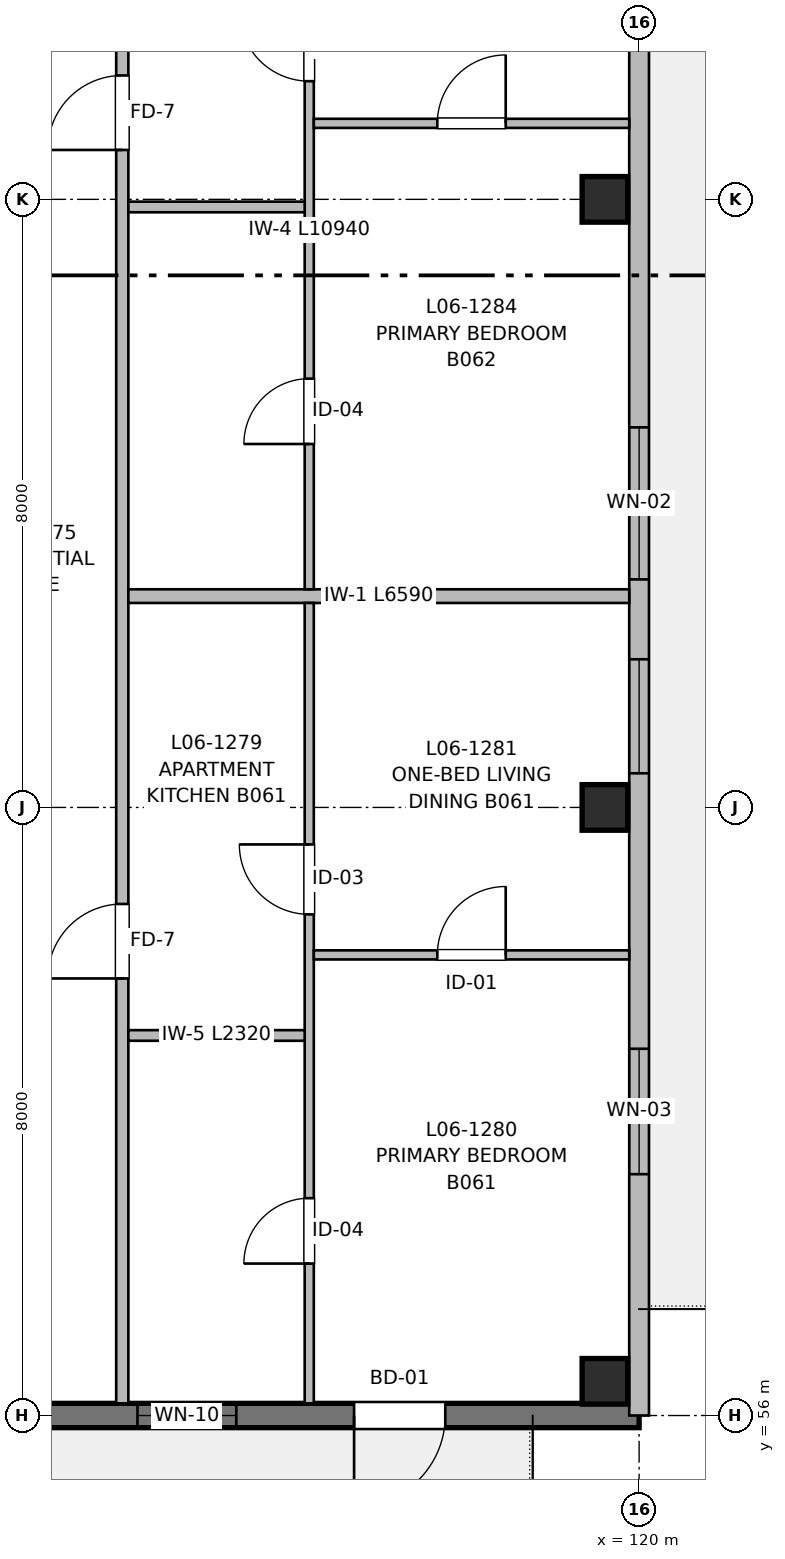
"""IFC4 building model, lengths in metres.
Left out: names, types, materials, properties, quantities, classifications, styles, units other than length and angle.
Written with IfcOpenShell. Run it as: python <this file> out.ifc"""

import sys

from ifc_helpers import new_model, si_unit, direction, frame, frame_2d, origin, origin_2d, place, context, subcontext, project, spatial, rectangle, extrude, element, fill, save


model = new_model("IFC4")
c1 = context("Model", 3, precision=1e-05, world=origin(), true_north=direction((0.0, 1.0)))
c2 = subcontext(c1, "Body", "Model", "MODEL_VIEW")
j1 = project(units=[si_unit("LENGTHUNIT", "METRE"), si_unit("PLANEANGLEUNIT", "RADIAN")], contexts=[c1])
p1 = place(None, origin())
s1 = spatial("IfcSite", under=j1, at=p1, CompositionType="ELEMENT")
p2 = place(p1, origin())
s2 = spatial("IfcBuilding", under=s1, at=p2, CompositionType="ELEMENT")
p3 = place(p2, frame((0.0, 0.0, 20.16)))
s3 = spatial("IfcBuildingStorey", under=s2, at=p3, CompositionType="ELEMENT", Elevation=20.16)
for number, where, z_axis, x_axis in (
    (1, (119.55, 56.45, 0.0), (0.0, 0.0, 1.0), (1.0, 0.0, 0.0)),
    (2, (119.55, 64.0, 0.0), (0.0, 0.0, 1.0), (1.0, 0.0, 0.0)),
    (3, (119.55, 72.0, 0.0), (0.0, 0.0, 1.0), (1.0, 0.0, 0.0)),
):
    element("IfcColumn", number, at=place(p3, frame(where, z_axis=z_axis, x_axis=x_axis)), inside=s3, PredefinedType="COLUMN", context=c2, shape_type="SweptSolid", body=[
        extrude(rectangle(XDim=0.6, YDim=0.6, at=origin_2d()), origin(), (0.0, 0.0, 1.0), 3.2),
    ])
p4 = place(p3, frame((120.0, 56.0, 0.0), z_axis=(0.0, 0.0, 1.0), x_axis=(-1.0, 0.0, 0.0)))
e4 = element("IfcWall", 4, at=p4, inside=s3, PredefinedType="SHEAR", context=c2, shape_type="SweptSolid", body=[
    extrude(rectangle(XDim=16.0, YDim=0.32, at=frame_2d((8.0, 0.0))), origin(), (0.0, 0.0, 1.0), 2.98),
])
p5 = place(p4, frame((2.55, 0.0, 0.0)))
e5 = element("IfcOpeningElement", 5, at=p5, cuts=e4, PredefinedType="OPENING", context=c2, shape_type="SweptSolid", body=[
    extrude(rectangle(XDim=1.2, YDim=2.2, at=frame_2d((0.6, 1.1))), frame((0.0, 0.17, 0.0), z_axis=(0.0, -1.0, 0.0), x_axis=(1.0, 0.0, 0.0)), (0.0, 0.0, 1.0), 0.34),
])
p6 = place(p4, frame((5.3, 0.0, 0.82)))
e6 = element("IfcOpeningElement", 6, at=p6, cuts=e4, PredefinedType="OPENING", context=c2, shape_type="SweptSolid", body=[
    extrude(rectangle(XDim=1.3, YDim=1.4, at=frame_2d((0.65, 0.7))), frame((0.0, 0.17, 0.0), z_axis=(0.0, -1.0, 0.0), x_axis=(1.0, 0.0, 0.0)), (0.0, 0.0, 1.0), 0.34),
])
p7 = place(p4, frame((11.1, 0.0, 0.72)))
e7 = element("IfcOpeningElement", 7, at=p7, cuts=e4, PredefinedType="OPENING", context=c2, shape_type="SweptSolid", body=[
    extrude(rectangle(XDim=1.8, YDim=1.5, at=frame_2d((0.9, 0.75))), frame((0.0, 0.17, 0.0), z_axis=(0.0, -1.0, 0.0), x_axis=(1.0, 0.0, 0.0)), (0.0, 0.0, 1.0), 0.34),
])
p8 = place(p3, frame((120.0, 88.0, 0.0), z_axis=(0.0, 0.0, 1.0), x_axis=(0.0, -1.0, 0.0)))
e8 = element("IfcWall", 8, at=p8, inside=s3, PredefinedType="SOLIDWALL", context=c2, shape_type="SweptSolid", body=[
    extrude(rectangle(XDim=32.0, YDim=0.26, at=frame_2d((16.0, 0.0))), origin(), (0.0, 0.0, 1.0), 2.98),
])
p9 = place(p8, frame((3.4, 0.0, 0.0)))
e9 = element("IfcOpeningElement", 9, at=p9, cuts=e8, PredefinedType="OPENING", context=c2, shape_type="SweptSolid", body=[
    extrude(rectangle(XDim=1.2, YDim=2.2, at=frame_2d((0.6, 1.1))), frame((0.0, 0.14, 0.0), z_axis=(0.0, -1.0, 0.0), x_axis=(1.0, 0.0, 0.0)), (0.0, 0.0, 1.0), 0.28),
])
p10 = place(p8, frame((6.15, 0.0, 0.82)))
e10 = element("IfcOpeningElement", 10, at=p10, cuts=e8, PredefinedType="OPENING", context=c2, shape_type="SweptSolid", body=[
    extrude(rectangle(XDim=1.3, YDim=1.4, at=frame_2d((0.65, 0.7))), frame((0.0, 0.14, 0.0), z_axis=(0.0, -1.0, 0.0), x_axis=(1.0, 0.0, 0.0)), (0.0, 0.0, 1.0), 0.28),
])
p11 = place(p8, frame((11.1, 0.0, 0.72)))
e11 = element("IfcOpeningElement", 11, at=p11, cuts=e8, PredefinedType="OPENING", context=c2, shape_type="SweptSolid", body=[
    extrude(rectangle(XDim=1.8, YDim=1.5, at=frame_2d((0.9, 0.75))), frame((0.0, 0.14, 0.0), z_axis=(0.0, -1.0, 0.0), x_axis=(1.0, 0.0, 0.0)), (0.0, 0.0, 1.0), 0.28),
])
p12 = place(p8, frame((19.0, 0.0, 0.72)))
e12 = element("IfcOpeningElement", 12, at=p12, cuts=e8, PredefinedType="OPENING", context=c2, shape_type="SweptSolid", body=[
    extrude(rectangle(XDim=2.0, YDim=1.5, at=frame_2d((1.0, 0.75))), frame((0.0, 0.14, 0.0), z_axis=(0.0, -1.0, 0.0), x_axis=(1.0, 0.0, 0.0)), (0.0, 0.0, 1.0), 0.28),
])
p13 = place(p8, frame((27.175, 0.0, 0.77)))
e13 = element("IfcOpeningElement", 13, at=p13, cuts=e8, PredefinedType="OPENING", context=c2, shape_type="SweptSolid", body=[
    extrude(rectangle(XDim=1.65, YDim=1.45, at=frame_2d((0.825, 0.725))), frame((0.0, 0.14, 0.0), z_axis=(0.0, -1.0, 0.0), x_axis=(1.0, 0.0, 0.0)), (0.0, 0.0, 1.0), 0.28),
])
p14 = place(p8, frame((22.051, 0.0, 0.82)))
e14 = element("IfcOpeningElement", 14, at=p14, cuts=e8, PredefinedType="OPENING", context=c2, shape_type="SweptSolid", body=[
    extrude(rectangle(XDim=1.5, YDim=1.4, at=frame_2d((0.75, 0.7))), frame((0.0, 0.14, 0.0), z_axis=(0.0, -1.0, 0.0), x_axis=(1.0, 0.0, 0.0)), (0.0, 0.0, 1.0), 0.28),
])
p15 = place(p3, frame((113.2, 56.16, 0.0), z_axis=(0.0, 0.0, 1.0), x_axis=(0.0, 1.0, 0.0)))
e15 = element("IfcWall", 15, at=p15, inside=s3, PredefinedType="PARTITIONING", context=c2, shape_type="SweptSolid", body=[
    extrude(rectangle(XDim=50.64, YDim=0.16, at=frame_2d((25.32, 0.0))), origin(), (0.0, 0.0, 1.0), 2.935),
])
p16 = place(p15, frame((5.59, 0.0, 0.0)))
e16 = element("IfcOpeningElement", 16, at=p16, cuts=e15, PredefinedType="OPENING", context=c2, shape_type="SweptSolid", body=[
    extrude(rectangle(XDim=0.98, YDim=2.15, at=frame_2d((0.49, 1.075))), frame((0.0, 0.09, 0.0), z_axis=(0.0, -1.0, 0.0), x_axis=(1.0, 0.0, 0.0)), (0.0, 0.0, 1.0), 0.18),
])
p17 = place(p15, frame((16.49, 0.0, 0.0)))
e17 = element("IfcOpeningElement", 17, at=p17, cuts=e15, PredefinedType="OPENING", context=c2, shape_type="SweptSolid", body=[
    extrude(rectangle(XDim=0.98, YDim=2.15, at=frame_2d((0.49, 1.075))), frame((0.0, 0.09, 0.0), z_axis=(0.0, -1.0, 0.0), x_axis=(1.0, 0.0, 0.0)), (0.0, 0.0, 1.0), 0.18),
])
p18 = place(p15, frame((28.55, 0.0, 0.0)))
e18 = element("IfcOpeningElement", 18, at=p18, cuts=e15, PredefinedType="OPENING", context=c2, shape_type="SweptSolid", body=[
    extrude(rectangle(XDim=0.98, YDim=2.15, at=frame_2d((0.49, 1.075))), frame((0.0, 0.09, 0.0), z_axis=(0.0, -1.0, 0.0), x_axis=(1.0, 0.0, 0.0)), (0.0, 0.0, 1.0), 0.18),
])
p19 = place(p15, frame((42.9, 0.0, 0.0)))
e19 = element("IfcOpeningElement", 19, at=p19, cuts=e15, PredefinedType="OPENING", context=c2, shape_type="SweptSolid", body=[
    extrude(rectangle(XDim=0.98, YDim=2.15, at=frame_2d((0.49, 1.075))), frame((0.0, 0.09, 0.0), z_axis=(0.0, -1.0, 0.0), x_axis=(1.0, 0.0, 0.0)), (0.0, 0.0, 1.0), 0.18),
])
p20 = place(p3, frame((113.28, 66.78, 0.0), z_axis=(0.0, 0.0, 1.0), x_axis=(1.0, 0.0, 0.0)))
e20 = element("IfcWall", 20, at=p20, inside=s3, PredefinedType="PARTITIONING", context=c2, shape_type="SweptSolid", body=[
    extrude(rectangle(XDim=6.59, YDim=0.18, at=frame_2d((3.295, 0.0))), origin(), (0.0, 0.0, 1.0), 2.935),
])
p21 = place(p3, frame((115.66, 56.16, 0.0), z_axis=(0.0, 0.0, 1.0), x_axis=(0.0, 1.0, 0.0)))
e21 = element("IfcWall", 21, at=p21, inside=s3, PredefinedType="PARTITIONING", context=c2, shape_type="SweptSolid", body=[
    extrude(rectangle(XDim=10.53, YDim=0.12, at=frame_2d((5.265, 0.0))), origin(), (0.0, 0.0, 1.0), 2.935),
])
p22 = place(p21, frame((1.839, 0.0, 0.0)))
e22 = element("IfcOpeningElement", 22, at=p22, cuts=e21, PredefinedType="OPENING", context=c2, shape_type="SweptSolid", body=[
    extrude(rectangle(XDim=0.86, YDim=2.1, at=frame_2d((0.43, 1.05))), frame((0.0, 0.07, 0.0), z_axis=(0.0, -1.0, 0.0), x_axis=(1.0, 0.0, 0.0)), (0.0, 0.0, 1.0), 0.14),
])
p23 = place(p21, frame((6.433, 0.0, 0.0)))
e23 = element("IfcOpeningElement", 23, at=p23, cuts=e21, PredefinedType="OPENING", context=c2, shape_type="SweptSolid", body=[
    extrude(rectangle(XDim=0.92, YDim=2.1, at=frame_2d((0.46, 1.05))), frame((0.0, 0.07, 0.0), z_axis=(0.0, -1.0, 0.0), x_axis=(1.0, 0.0, 0.0)), (0.0, 0.0, 1.0), 0.14),
])
p24 = place(p3, frame((113.28, 61.0, 0.0), z_axis=(0.0, 0.0, 1.0), x_axis=(1.0, 0.0, 0.0)))
e24 = element("IfcWall", 24, at=p24, inside=s3, PredefinedType="PARTITIONING", context=c2, shape_type="SweptSolid", body=[
    extrude(rectangle(XDim=2.32, YDim=0.14, at=frame_2d((1.16, 0.0))), origin(), (0.0, 0.0, 1.0), 2.935),
])
p25 = place(p3, frame((115.72, 62.06, 0.0), z_axis=(0.0, 0.0, 1.0), x_axis=(1.0, 0.0, 0.0)))
e25 = element("IfcWall", 25, at=p25, inside=s3, PredefinedType="PARTITIONING", context=c2, shape_type="SweptSolid", body=[
    extrude(rectangle(XDim=4.15, YDim=0.12, at=frame_2d((2.075, 0.0))), origin(), (0.0, 0.0, 1.0), 2.935),
])
p26 = place(p25, frame((1.625, 0.0, 0.0)))
e26 = element("IfcOpeningElement", 26, at=p26, cuts=e25, PredefinedType="OPENING", context=c2, shape_type="SweptSolid", body=[
    extrude(rectangle(XDim=0.9, YDim=2.1, at=frame_2d((0.45, 1.05))), frame((0.0, 0.07, 0.0), z_axis=(0.0, -1.0, 0.0), x_axis=(1.0, 0.0, 0.0)), (0.0, 0.0, 1.0), 0.14),
])
p27 = place(p3, frame((115.66, 66.87, 0.0), z_axis=(0.0, 0.0, 1.0), x_axis=(0.0, 1.0, 0.0)))
e27 = element("IfcWall", 27, at=p27, inside=s3, PredefinedType="PARTITIONING", context=c2, shape_type="SweptSolid", body=[
    extrude(rectangle(XDim=10.94, YDim=0.12, at=frame_2d((5.47, 0.0))), origin(), (0.0, 0.0, 1.0), 2.935),
])
p28 = place(p27, frame((1.911, 0.0, 0.0)))
e28 = element("IfcOpeningElement", 28, at=p28, cuts=e27, PredefinedType="OPENING", context=c2, shape_type="SweptSolid", body=[
    extrude(rectangle(XDim=0.86, YDim=2.1, at=frame_2d((0.43, 1.05))), frame((0.0, 0.07, 0.0), z_axis=(0.0, -1.0, 0.0), x_axis=(1.0, 0.0, 0.0)), (0.0, 0.0, 1.0), 0.14),
])
p29 = place(p27, frame((6.685, 0.0, 0.0)))
e29 = element("IfcOpeningElement", 29, at=p29, cuts=e27, PredefinedType="OPENING", context=c2, shape_type="SweptSolid", body=[
    extrude(rectangle(XDim=0.92, YDim=2.1, at=frame_2d((0.46, 1.05))), frame((0.0, 0.07, 0.0), z_axis=(0.0, -1.0, 0.0), x_axis=(1.0, 0.0, 0.0)), (0.0, 0.0, 1.0), 0.14),
])
p30 = place(p3, frame((113.28, 71.9, 0.0), z_axis=(0.0, 0.0, 1.0), x_axis=(1.0, 0.0, 0.0)))
e30 = element("IfcWall", 30, at=p30, inside=s3, PredefinedType="PARTITIONING", context=c2, shape_type="SweptSolid", body=[
    extrude(rectangle(XDim=2.32, YDim=0.14, at=frame_2d((1.16, 0.0))), origin(), (0.0, 0.0, 1.0), 2.53),
])
p31 = place(p3, frame((115.72, 73.0, 0.0), z_axis=(0.0, 0.0, 1.0), x_axis=(1.0, 0.0, 0.0)))
e31 = element("IfcWall", 31, at=p31, inside=s3, PredefinedType="PARTITIONING", context=c2, shape_type="SweptSolid", body=[
    extrude(rectangle(XDim=4.15, YDim=0.12, at=frame_2d((2.075, 0.0))), origin(), (0.0, 0.0, 1.0), 2.935),
])
p32 = place(p31, frame((1.625, 0.0, 0.0)))
e32 = element("IfcOpeningElement", 32, at=p32, cuts=e31, PredefinedType="OPENING", context=c2, shape_type="SweptSolid", body=[
    extrude(rectangle(XDim=0.9, YDim=2.1, at=frame_2d((0.45, 1.05))), frame((0.0, 0.07, 0.0), z_axis=(0.0, -1.0, 0.0), x_axis=(1.0, 0.0, 0.0)), (0.0, 0.0, 1.0), 0.14),
])
p33 = place(p5, origin())
e33 = element("IfcDoor", 33, at=p33, inside=s3, OperationType="SINGLE_SWING_RIGHT", PredefinedType="DOOR", context=c2, shape_type="SweptSolid", body=[
    extrude(rectangle(XDim=1.2, YDim=2.2, at=frame_2d((0.6, 1.1))), frame((0.0, 0.025, 0.0), z_axis=(0.0, -1.0, 0.0), x_axis=(1.0, 0.0, 0.0)), (0.0, 0.0, 1.0), 0.05),
])
fill(e5, e33)
p34 = place(p6, origin())
e34 = element("IfcWindow", 34, at=p34, inside=s3, PartitioningType="SINGLE_PANEL", PredefinedType="WINDOW", context=c2, shape_type="SweptSolid", body=[
    extrude(rectangle(XDim=1.3, YDim=1.4, at=frame_2d((0.65, 0.7))), frame((0.0, 0.03, 0.0), z_axis=(0.0, -1.0, 0.0), x_axis=(1.0, 0.0, 0.0)), (0.0, 0.0, 1.0), 0.06),
])
fill(e6, e34)
p35 = place(p12, origin())
e35 = element("IfcWindow", 35, at=p35, inside=s3, PartitioningType="SINGLE_PANEL", PredefinedType="WINDOW", context=c2, shape_type="SweptSolid", body=[
    extrude(rectangle(XDim=2.0, YDim=1.5, at=frame_2d((1.0, 0.75))), frame((0.0, 0.03, 0.0), z_axis=(0.0, -1.0, 0.0), x_axis=(1.0, 0.0, 0.0)), (0.0, 0.0, 1.0), 0.06),
])
fill(e12, e35)
p36 = place(p13, origin())
e36 = element("IfcWindow", 36, at=p36, inside=s3, PartitioningType="SINGLE_PANEL", PredefinedType="WINDOW", context=c2, shape_type="SweptSolid", body=[
    extrude(rectangle(XDim=1.65, YDim=1.45, at=frame_2d((0.825, 0.725))), frame((0.0, 0.03, 0.0), z_axis=(0.0, -1.0, 0.0), x_axis=(1.0, 0.0, 0.0)), (0.0, 0.0, 1.0), 0.06),
])
fill(e13, e36)
p37 = place(p22, origin())
e37 = element("IfcDoor", 37, at=p37, inside=s3, OperationType="SINGLE_SWING_LEFT", PredefinedType="DOOR", context=c2, shape_type="SweptSolid", body=[
    extrude(rectangle(XDim=0.86, YDim=2.1, at=frame_2d((0.43, 1.05))), frame((0.0, 0.025, 0.0), z_axis=(0.0, -1.0, 0.0), x_axis=(1.0, 0.0, 0.0)), (0.0, 0.0, 1.0), 0.05),
])
fill(e22, e37)
p38 = place(p23, origin())
e38 = element("IfcDoor", 38, at=p38, inside=s3, OperationType="SINGLE_SWING_RIGHT", PredefinedType="DOOR", context=c2, shape_type="SweptSolid", body=[
    extrude(rectangle(XDim=0.92, YDim=2.1, at=frame_2d((0.46, 1.05))), frame((0.0, 0.025, 0.0), z_axis=(0.0, -1.0, 0.0), x_axis=(1.0, 0.0, 0.0)), (0.0, 0.0, 1.0), 0.05),
])
fill(e23, e38)
p39 = place(p16, origin())
e39 = element("IfcDoor", 39, at=p39, inside=s3, OperationType="SINGLE_SWING_LEFT", PredefinedType="DOOR", context=c2, shape_type="SweptSolid", body=[
    extrude(rectangle(XDim=0.98, YDim=2.15, at=frame_2d((0.49, 1.075))), frame((0.0, 0.025, 0.0), z_axis=(0.0, -1.0, 0.0), x_axis=(1.0, 0.0, 0.0)), (0.0, 0.0, 1.0), 0.05),
])
fill(e16, e39)
p40 = place(p26, origin())
e40 = element("IfcDoor", 40, at=p40, inside=s3, OperationType="SINGLE_SWING_RIGHT", PredefinedType="DOOR", context=c2, shape_type="SweptSolid", body=[
    extrude(rectangle(XDim=0.9, YDim=2.1, at=frame_2d((0.45, 1.05))), frame((0.0, 0.025, 0.0), z_axis=(0.0, -1.0, 0.0), x_axis=(1.0, 0.0, 0.0)), (0.0, 0.0, 1.0), 0.05),
])
fill(e26, e40)
p41 = place(p28, origin())
e41 = element("IfcDoor", 41, at=p41, inside=s3, OperationType="SINGLE_SWING_LEFT", PredefinedType="DOOR", context=c2, shape_type="SweptSolid", body=[
    extrude(rectangle(XDim=0.86, YDim=2.1, at=frame_2d((0.43, 1.05))), frame((0.0, 0.025, 0.0), z_axis=(0.0, -1.0, 0.0), x_axis=(1.0, 0.0, 0.0)), (0.0, 0.0, 1.0), 0.05),
])
fill(e28, e41)
p42 = place(p29, origin())
e42 = element("IfcDoor", 42, at=p42, inside=s3, OperationType="SINGLE_SWING_RIGHT", PredefinedType="DOOR", context=c2, shape_type="SweptSolid", body=[
    extrude(rectangle(XDim=0.92, YDim=2.1, at=frame_2d((0.46, 1.05))), frame((0.0, 0.025, 0.0), z_axis=(0.0, -1.0, 0.0), x_axis=(1.0, 0.0, 0.0)), (0.0, 0.0, 1.0), 0.05),
])
fill(e29, e42)
p43 = place(p17, origin())
e43 = element("IfcDoor", 43, at=p43, inside=s3, OperationType="SINGLE_SWING_LEFT", PredefinedType="DOOR", context=c2, shape_type="SweptSolid", body=[
    extrude(rectangle(XDim=0.98, YDim=2.15, at=frame_2d((0.49, 1.075))), frame((0.0, 0.025, 0.0), z_axis=(0.0, -1.0, 0.0), x_axis=(1.0, 0.0, 0.0)), (0.0, 0.0, 1.0), 0.05),
])
fill(e17, e43)
p44 = place(p32, origin())
e44 = element("IfcDoor", 44, at=p44, inside=s3, OperationType="SINGLE_SWING_RIGHT", PredefinedType="DOOR", context=c2, shape_type="SweptSolid", body=[
    extrude(rectangle(XDim=0.9, YDim=2.1, at=frame_2d((0.45, 1.05))), frame((0.0, 0.025, 0.0), z_axis=(0.0, -1.0, 0.0), x_axis=(1.0, 0.0, 0.0)), (0.0, 0.0, 1.0), 0.05),
])
fill(e32, e44)
p45 = place(p14, origin())
e45 = element("IfcWindow", 45, at=p45, inside=s3, PartitioningType="SINGLE_PANEL", PredefinedType="WINDOW", context=c2, shape_type="SweptSolid", body=[
    extrude(rectangle(XDim=1.5, YDim=1.4, at=frame_2d((0.75, 0.7))), frame((0.0, 0.03, 0.0), z_axis=(0.0, -1.0, 0.0), x_axis=(1.0, 0.0, 0.0)), (0.0, 0.0, 1.0), 0.06),
])
fill(e14, e45)
save(model, sys.argv[1])
